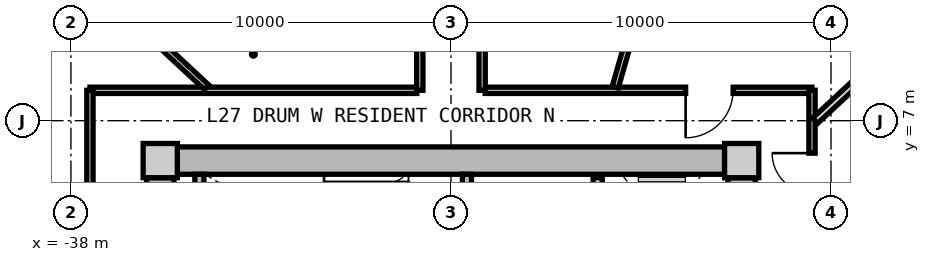
"""IFC4 building model, lengths in metres.
Left out: names, types, materials, properties, quantities, classifications, styles, units other than length and angle.
Written with IfcOpenShell. Run it as: python <this file> out.ifc"""

import sys

from ifc_helpers import new_model, si_unit, direction, frame, frame_2d, origin, origin_2d, place, context, subcontext, project, spatial, rectangle, extrude, source, transform, mapped, element, fill, save


model = new_model("IFC4")
c1 = context("Model", 3, precision=1e-05, world=origin(), true_north=direction((0.0, 1.0)))
c2 = subcontext(c1, "Body", "Model", "MODEL_VIEW")
j1 = project(units=[si_unit("LENGTHUNIT", "METRE"), si_unit("PLANEANGLEUNIT", "RADIAN")], contexts=[c1])
p1 = place(None, origin())
s1 = spatial("IfcSite", under=j1, at=p1, CompositionType="ELEMENT")
p2 = place(p1, origin())
s2 = spatial("IfcBuilding", under=s1, at=p2, CompositionType="ELEMENT")
p3 = place(p2, frame((0.0, 0.0, 90.15)))
s3 = spatial("IfcBuildingStorey", under=s2, at=p3, CompositionType="ELEMENT", Elevation=90.15)
m1 = source(origin(), c2, "Body", "SweptSolid", [
    extrude(rectangle(XDim=0.9, YDim=0.9, at=origin_2d()), origin(), (0.0, 0.0, 1.0), 3.05),
])
for number, where, z_axis, x_axis in (
    (1, (-20.35, 5.95, 0.0), (0.0, 0.0, 1.0), (1.0, 0.0, 0.0)),
    (2, (-35.65, 5.95, 0.0), (0.0, 0.0, 1.0), (1.0, 0.0, 0.0)),
):
    element("IfcColumn", number, at=place(p3, frame(where, z_axis=z_axis, x_axis=x_axis)), inside=s3, PredefinedType="COLUMN", context=c2, shape_type="MappedRepresentation", body=[
        mapped(m1, transform((0.0, 0.0, 0.0), x_axis=(1.0, 0.0, 0.0), y_axis=(0.0, 1.0, 0.0), z_axis=(0.0, 0.0, 1.0), scale=1.0)),
    ])
m2 = source(origin(), c2, "Body", "SweptSolid", [
    extrude(rectangle(XDim=14.4, YDim=0.72, at=frame_2d((7.2, 0.0))), origin(), (0.0, 0.0, 1.0), 2.79),
])
p4 = place(p3, frame((-35.2, 5.95, 0.0), z_axis=(0.0, 0.0, 1.0), x_axis=(1.0, 0.0, 0.0)))
e3 = element("IfcWall", 3, at=p4, inside=s3, PredefinedType="SHEAR", context=c2, shape_type="MappedRepresentation", body=[
    mapped(m2, transform((0.0, 0.0, 0.0), x_axis=(1.0, 0.0, 0.0), y_axis=(0.0, 1.0, 0.0), z_axis=(0.0, 0.0, 1.0), scale=1.0)),
])
m3 = source(origin(), c2, "Body", "SweptSolid", [
    extrude(rectangle(XDim=11.0, YDim=0.72, at=frame_2d((5.5, 0.0))), origin(), (0.0, 0.0, 1.0), 2.79),
])
p5 = place(p3, frame((-35.65, -5.5, 0.0), z_axis=(0.0, 0.0, 1.0), x_axis=(0.0, 1.0, 0.0)))
e4 = element("IfcWall", 4, at=p5, inside=s3, PredefinedType="SHEAR", context=c2, shape_type="MappedRepresentation", body=[
    mapped(m3, transform((0.0, 0.0, 0.0), x_axis=(1.0, 0.0, 0.0), y_axis=(0.0, 1.0, 0.0), z_axis=(0.0, 0.0, 1.0), scale=1.0)),
])
p6 = place(p5, frame((3.8, 0.0, 0.0)))
e5 = element("IfcOpeningElement", 5, at=p6, cuts=e4, PredefinedType="OPENING", context=c2, shape_type="SweptSolid", body=[
    extrude(rectangle(XDim=1.2, YDim=2.15, at=frame_2d((0.6, 1.075))), frame((0.0, 0.37, 0.0), z_axis=(0.0, -1.0, 0.0), x_axis=(1.0, 0.0, 0.0)), (0.0, 0.0, 1.0), 0.74),
])
p7 = place(p3, frame((-20.35, 5.5, 0.0), z_axis=(0.0, 0.0, 1.0), x_axis=(0.0, -1.0, 0.0)))
e6 = element("IfcWall", 6, at=p7, inside=s3, PredefinedType="SHEAR", context=c2, shape_type="MappedRepresentation", body=[
    mapped(m3, transform((0.0, 0.0, 0.0), x_axis=(1.0, 0.0, 0.0), y_axis=(0.0, 1.0, 0.0), z_axis=(0.0, 0.0, 1.0), scale=1.0)),
])
p8 = place(p7, frame((5.65, 0.0, 0.0)))
e7 = element("IfcOpeningElement", 7, at=p8, cuts=e6, PredefinedType="OPENING", context=c2, shape_type="SweptSolid", body=[
    extrude(rectangle(XDim=1.2, YDim=2.15, at=frame_2d((0.6, 1.075))), frame((0.0, 0.37, 0.0), z_axis=(0.0, -1.0, 0.0), x_axis=(1.0, 0.0, 0.0)), (0.0, 0.0, 1.0), 0.74),
])
m4 = source(origin(), c2, "Body", "SweptSolid", [
    extrude(rectangle(XDim=3.14, YDim=0.24, at=frame_2d((1.57, 0.0))), origin(), (0.0, 0.0, 1.0), 2.79),
])
p9 = place(p3, frame((-34.62, 2.45, 0.0), z_axis=(0.0, 0.0, 1.0), x_axis=(0.0, 1.0, 0.0)))
e8 = element("IfcWall", 8, at=p9, inside=s3, PredefinedType="PARTITIONING", context=c2, shape_type="MappedRepresentation", body=[
    mapped(m4, transform((0.0, 0.0, 0.0), x_axis=(1.0, 0.0, 0.0), y_axis=(0.0, 1.0, 0.0), z_axis=(0.0, 0.0, 1.0), scale=1.0)),
])
p10 = place(p3, frame((-27.58, 2.45, 0.0), z_axis=(0.0, 0.0, 1.0), x_axis=(0.0, 1.0, 0.0)))
e9 = element("IfcWall", 9, at=p10, inside=s3, PredefinedType="PARTITIONING", context=c2, shape_type="MappedRepresentation", body=[
    mapped(m4, transform((0.0, 0.0, 0.0), x_axis=(1.0, 0.0, 0.0), y_axis=(0.0, 1.0, 0.0), z_axis=(0.0, 0.0, 1.0), scale=1.0)),
])
p11 = place(p10, frame((0.55, 0.0, 0.0)))
e10 = element("IfcOpeningElement", 10, at=p11, cuts=e9, PredefinedType="OPENING", context=c2, shape_type="SweptSolid", body=[
    extrude(rectangle(XDim=1.1, YDim=2.15, at=frame_2d((0.55, 1.075))), frame((0.0, 0.13, 0.0), z_axis=(0.0, -1.0, 0.0), x_axis=(1.0, 0.0, 0.0)), (0.0, 0.0, 1.0), 0.26),
])
m5 = source(origin(), c2, "Body", "SweptSolid", [
    extrude(rectangle(XDim=5.0, YDim=0.24, at=frame_2d((2.5, 0.0))), origin(), (0.0, 0.0, 1.0), 2.775),
])
p12 = place(p3, frame((-24.14, 0.5, 0.0), z_axis=(0.0, 0.0, 1.0), x_axis=(0.0, 1.0, 0.0)))
e11 = element("IfcWall", 11, at=p12, inside=s3, PredefinedType="PARTITIONING", context=c2, shape_type="MappedRepresentation", body=[
    mapped(m5, transform((0.0, 0.0, 0.0), x_axis=(1.0, 0.0, 0.0), y_axis=(0.0, 1.0, 0.0), z_axis=(0.0, 0.0, 1.0), scale=1.0)),
])
p13 = place(p12, frame((3.05, 0.0, 0.0)))
e12 = element("IfcOpeningElement", 12, at=p13, cuts=e11, PredefinedType="OPENING", context=c2, shape_type="SweptSolid", body=[
    extrude(rectangle(XDim=1.3, YDim=2.2, at=frame_2d((0.65, 1.1))), frame((0.0, 0.13, 0.0), z_axis=(0.0, -1.0, 0.0), x_axis=(1.0, 0.0, 0.0)), (0.0, 0.0, 1.0), 0.26),
])
p14 = place(p12, frame((0.55, 0.0, 0.0)))
e13 = element("IfcOpeningElement", 13, at=p14, cuts=e11, PredefinedType="OPENING", context=c2, shape_type="SweptSolid", body=[
    extrude(rectangle(XDim=1.3, YDim=2.2, at=frame_2d((0.65, 1.1))), frame((0.0, 0.13, 0.0), z_axis=(0.0, -1.0, 0.0), x_axis=(1.0, 0.0, 0.0)), (0.0, 0.0, 1.0), 0.26),
])
m6 = source(origin(), c2, "Body", "SweptSolid", [
    extrude(rectangle(XDim=8.6, YDim=0.165, at=frame_2d((4.3, 0.0))), origin(), (0.0, 0.0, 1.0), 2.775),
])
p15 = place(p3, frame((-37.5, 7.8, 0.0), z_axis=(0.0, 0.0, 1.0), x_axis=(1.0, 0.0, 0.0)))
e14 = element("IfcWall", 14, at=p15, inside=s3, PredefinedType="PARTITIONING", context=c2, shape_type="MappedRepresentation", body=[
    mapped(m6, transform((0.0, 0.0, 0.0), x_axis=(1.0, 0.0, 0.0), y_axis=(0.0, 1.0, 0.0), z_axis=(0.0, 0.0, 1.0), scale=1.0)),
])
p16 = place(p3, frame((-27.1, 7.8, 0.0), z_axis=(0.0, 0.0, 1.0), x_axis=(1.0, 0.0, 0.0)))
e15 = element("IfcWall", 15, at=p16, inside=s3, PredefinedType="PARTITIONING", context=c2, shape_type="MappedRepresentation", body=[
    mapped(m6, transform((0.0, 0.0, 0.0), x_axis=(1.0, 0.0, 0.0), y_axis=(0.0, 1.0, 0.0), z_axis=(0.0, 0.0, 1.0), scale=1.0)),
])
p17 = place(p16, frame((5.275, 0.0, 0.0)))
e16 = element("IfcOpeningElement", 16, at=p17, cuts=e15, PredefinedType="OPENING", context=c2, shape_type="SweptSolid", body=[
    extrude(rectangle(XDim=1.25, YDim=2.2, at=frame_2d((0.625, 1.1))), frame((0.0, 0.093, 0.0), z_axis=(0.0, -1.0, 0.0), x_axis=(1.0, 0.0, 0.0)), (0.0, 0.0, 1.0), 0.185),
])
m7 = source(origin(), c2, "Body", "SweptSolid", [
    extrude(rectangle(XDim=15.6, YDim=0.165, at=frame_2d((7.8, 0.0))), origin(), (0.0, 0.0, 1.0), 2.775),
])
p18 = place(p3, frame((-37.5, -7.8, 0.0), z_axis=(0.0, 0.0, 1.0), x_axis=(0.0, 1.0, 0.0)))
e17 = element("IfcWall", 17, at=p18, inside=s3, PredefinedType="PARTITIONING", context=c2, shape_type="MappedRepresentation", body=[
    mapped(m7, transform((0.0, 0.0, 0.0), x_axis=(1.0, 0.0, 0.0), y_axis=(0.0, 1.0, 0.0), z_axis=(0.0, 0.0, 1.0), scale=1.0)),
])
p19 = place(p18, frame((7.175, 0.0, 0.0)))
e18 = element("IfcOpeningElement", 18, at=p19, cuts=e17, PredefinedType="OPENING", context=c2, shape_type="SweptSolid", body=[
    extrude(rectangle(XDim=1.25, YDim=2.2, at=frame_2d((0.625, 1.1))), frame((0.0, 0.093, 0.0), z_axis=(0.0, -1.0, 0.0), x_axis=(1.0, 0.0, 0.0)), (0.0, 0.0, 1.0), 0.185),
])
p20 = place(p3, frame((-18.5, 7.8, 0.0), z_axis=(0.0, 0.0, 1.0), x_axis=(0.0, -1.0, 0.0)))
e19 = element("IfcWall", 19, at=p20, inside=s3, PredefinedType="PARTITIONING", context=c2, shape_type="MappedRepresentation", body=[
    mapped(m7, transform((0.0, 0.0, 0.0), x_axis=(1.0, 0.0, 0.0), y_axis=(0.0, 1.0, 0.0), z_axis=(0.0, 0.0, 1.0), scale=1.0)),
])
p21 = place(p20, frame((12.002, 0.0, 0.0)))
e20 = element("IfcOpeningElement", 20, at=p21, cuts=e19, PredefinedType="OPENING", context=c2, shape_type="SweptSolid", body=[
    extrude(rectangle(XDim=1.05, YDim=2.15, at=frame_2d((0.525, 1.075))), frame((0.0, 0.093, 0.0), z_axis=(0.0, -1.0, 0.0), x_axis=(1.0, 0.0, 0.0)), (0.0, 0.0, 1.0), 0.185),
])
p22 = place(p20, frame((10.211, 0.0, 0.0)))
e21 = element("IfcOpeningElement", 21, at=p22, cuts=e19, PredefinedType="OPENING", context=c2, shape_type="SweptSolid", body=[
    extrude(rectangle(XDim=1.05, YDim=2.15, at=frame_2d((0.525, 1.075))), frame((0.0, 0.093, 0.0), z_axis=(0.0, -1.0, 0.0), x_axis=(1.0, 0.0, 0.0)), (0.0, 0.0, 1.0), 0.185),
])
p23 = place(p20, frame((7.722, 0.0, 0.0)))
e22 = element("IfcOpeningElement", 22, at=p23, cuts=e19, PredefinedType="OPENING", context=c2, shape_type="SweptSolid", body=[
    extrude(rectangle(XDim=1.05, YDim=2.15, at=frame_2d((0.525, 1.075))), frame((0.0, 0.093, 0.0), z_axis=(0.0, -1.0, 0.0), x_axis=(1.0, 0.0, 0.0)), (0.0, 0.0, 1.0), 0.185),
])
p24 = place(p20, frame((6.291, 0.0, 0.0)))
e23 = element("IfcOpeningElement", 23, at=p24, cuts=e19, PredefinedType="OPENING", context=c2, shape_type="SweptSolid", body=[
    extrude(rectangle(XDim=1.05, YDim=2.15, at=frame_2d((0.525, 1.075))), frame((0.0, 0.093, 0.0), z_axis=(0.0, -1.0, 0.0), x_axis=(1.0, 0.0, 0.0)), (0.0, 0.0, 1.0), 0.185),
])
p25 = place(p20, frame((4.296, 0.0, 0.0)))
e24 = element("IfcOpeningElement", 24, at=p25, cuts=e19, PredefinedType="OPENING", context=c2, shape_type="SweptSolid", body=[
    extrude(rectangle(XDim=1.05, YDim=2.15, at=frame_2d((0.525, 1.075))), frame((0.0, 0.093, 0.0), z_axis=(0.0, -1.0, 0.0), x_axis=(1.0, 0.0, 0.0)), (0.0, 0.0, 1.0), 0.185),
])
p26 = place(p20, frame((1.654, 0.0, 0.0)))
e25 = element("IfcOpeningElement", 25, at=p26, cuts=e19, PredefinedType="OPENING", context=c2, shape_type="SweptSolid", body=[
    extrude(rectangle(XDim=1.05, YDim=2.15, at=frame_2d((0.525, 1.075))), frame((0.0, 0.093, 0.0), z_axis=(0.0, -1.0, 0.0), x_axis=(1.0, 0.0, 0.0)), (0.0, 0.0, 1.0), 0.185),
])
m8 = source(origin(), c2, "Body", "SweptSolid", [
    extrude(rectangle(XDim=8.989, YDim=0.165, at=frame_2d((4.495, 0.0))), origin(), (0.0, 0.0, 1.0), 2.275),
])
p27 = place(p3, frame((-23.678, 7.88, 0.0), z_axis=(0.0, 0.0, 1.0), x_axis=(0.27702323008, 0.960863221274, 0.0)))
e26 = element("IfcWall", 26, at=p27, inside=s3, PredefinedType="PARTITIONING", context=c2, shape_type="MappedRepresentation", body=[
    mapped(m8, transform((0.0, 0.0, 0.0), x_axis=(1.0, 0.0, 0.0), y_axis=(0.0, 1.0, 0.0), z_axis=(0.0, 0.0, 1.0), scale=1.0)),
])
m9 = source(origin(), c2, "Body", "SweptSolid", [
    extrude(rectangle(XDim=6.187, YDim=0.165, at=frame_2d((3.093, 0.0))), origin(), (0.0, 0.0, 1.0), 2.275),
])
p28 = place(p3, frame((-34.429, 7.88, 0.0), z_axis=(0.0, 0.0, 1.0), x_axis=(-0.732501077882, 0.680765870841, 0.0)))
e27 = element("IfcWall", 27, at=p28, inside=s3, PredefinedType="PARTITIONING", context=c2, shape_type="MappedRepresentation", body=[
    mapped(m9, transform((0.0, 0.0, 0.0), x_axis=(1.0, 0.0, 0.0), y_axis=(0.0, 1.0, 0.0), z_axis=(0.0, 0.0, 1.0), scale=1.0)),
])
m10 = source(origin(), c2, "Body", "SweptSolid", [
    extrude(rectangle(XDim=7.56, YDim=0.165, at=frame_2d((3.78, 0.0))), origin(), (0.0, 0.0, 1.0), 2.775),
])
p29 = place(p3, frame((-28.82, 7.8, 0.0), z_axis=(0.0, 0.0, 1.0), x_axis=(0.0, 1.0, 0.0)))
e28 = element("IfcWall", 28, at=p29, inside=s3, PredefinedType="PARTITIONING", context=c2, shape_type="MappedRepresentation", body=[
    mapped(m10, transform((0.0, 0.0, 0.0), x_axis=(1.0, 0.0, 0.0), y_axis=(0.0, 1.0, 0.0), z_axis=(0.0, 0.0, 1.0), scale=1.0)),
])
p30 = place(p29, frame((3.255, 0.0, 0.0)))
e29 = element("IfcOpeningElement", 29, at=p30, cuts=e28, PredefinedType="OPENING", context=c2, shape_type="SweptSolid", body=[
    extrude(rectangle(XDim=1.05, YDim=2.15, at=frame_2d((0.525, 1.075))), frame((0.0, 0.093, 0.0), z_axis=(0.0, -1.0, 0.0), x_axis=(1.0, 0.0, 0.0)), (0.0, 0.0, 1.0), 0.185),
])
p31 = place(p3, frame((-27.18, 7.8, 0.0), z_axis=(0.0, 0.0, 1.0), x_axis=(0.0, 1.0, 0.0)))
e30 = element("IfcWall", 30, at=p31, inside=s3, PredefinedType="PARTITIONING", context=c2, shape_type="MappedRepresentation", body=[
    mapped(m10, transform((0.0, 0.0, 0.0), x_axis=(1.0, 0.0, 0.0), y_axis=(0.0, 1.0, 0.0), z_axis=(0.0, 0.0, 1.0), scale=1.0)),
])
p32 = place(p31, frame((3.255, 0.0, 0.0)))
e31 = element("IfcOpeningElement", 31, at=p32, cuts=e30, PredefinedType="OPENING", context=c2, shape_type="SweptSolid", body=[
    extrude(rectangle(XDim=1.05, YDim=2.15, at=frame_2d((0.525, 1.075))), frame((0.0, 0.093, 0.0), z_axis=(0.0, -1.0, 0.0), x_axis=(1.0, 0.0, 0.0)), (0.0, 0.0, 1.0), 0.185),
])
m11 = source(origin(), c2, "Body", "SweptSolid", [
    extrude(rectangle(XDim=7.482, YDim=0.19, at=frame_2d((3.741, 0.0))), origin(), (0.0, 0.0, 1.0), 2.275),
])
p33 = place(p3, frame((-18.42, 6.998, 0.0), z_axis=(0.0, 0.0, 1.0), x_axis=(0.732508698043, 0.680757671489, 0.0)))
e32 = element("IfcWall", 32, at=p33, inside=s3, PredefinedType="PARTITIONING", context=c2, shape_type="MappedRepresentation", body=[
    mapped(m11, transform((0.0, 0.0, 0.0), x_axis=(1.0, 0.0, 0.0), y_axis=(0.0, 1.0, 0.0), z_axis=(0.0, 0.0, 1.0), scale=1.0)),
])
m12 = source(origin(), c2, "Body", "SweptSolid", [
    extrude(rectangle(XDim=8.968, YDim=0.19, at=frame_2d((4.484, 0.0))), origin(), (0.0, 0.0, 1.0), 2.775),
])
p34 = place(p3, frame((-18.47, 4.036, 0.0), z_axis=(0.0, 0.0, 1.0), x_axis=(0.882202936563, 0.47086938605, 0.0)))
e33 = element("IfcWall", 33, at=p34, inside=s3, PredefinedType="PARTITIONING", context=c2, shape_type="MappedRepresentation", body=[
    mapped(m12, transform((0.0, 0.0, 0.0), x_axis=(1.0, 0.0, 0.0), y_axis=(0.0, 1.0, 0.0), z_axis=(0.0, 0.0, 1.0), scale=1.0)),
])
m13 = source(origin(), c2, "Body", "SweptSolid", [
    extrude(rectangle(XDim=1.05, YDim=2.15, at=frame_2d((0.525, 1.075))), frame((0.0, 0.025, 0.0), z_axis=(0.0, -1.0, 0.0), x_axis=(1.0, 0.0, 0.0)), (0.0, 0.0, 1.0), 0.05),
])
p35 = place(p26, frame((1.05, 0.0, 0.0), z_axis=(0.0, 0.0, 1.0), x_axis=(-1.0, 0.0, 0.0)))
e34 = element("IfcDoor", 34, at=p35, inside=s3, OperationType="SINGLE_SWING_RIGHT", PredefinedType="DOOR", context=c2, shape_type="MappedRepresentation", body=[
    mapped(m13, transform((0.0, 0.0, 0.0), x_axis=(1.0, 0.0, 0.0), y_axis=(0.0, 1.0, 0.0), z_axis=(0.0, 0.0, 1.0), scale=1.0)),
])
fill(e25, e34)
m14 = source(origin(), c2, "Body", "SweptSolid", [
    extrude(rectangle(XDim=1.25, YDim=2.2, at=frame_2d((0.625, 1.1))), frame((0.0, 0.025, 0.0), z_axis=(0.0, -1.0, 0.0), x_axis=(1.0, 0.0, 0.0)), (0.0, 0.0, 1.0), 0.05),
])
p36 = place(p17, frame((1.25, 0.0, 0.0), z_axis=(0.0, 0.0, 1.0), x_axis=(-1.0, 0.0, 0.0)))
e35 = element("IfcDoor", 35, at=p36, inside=s3, OperationType="SINGLE_SWING_RIGHT", PredefinedType="DOOR", context=c2, shape_type="MappedRepresentation", body=[
    mapped(m14, transform((0.0, 0.0, 0.0), x_axis=(1.0, 0.0, 0.0), y_axis=(0.0, 1.0, 0.0), z_axis=(0.0, 0.0, 1.0), scale=1.0)),
])
fill(e16, e35)
save(model, sys.argv[1])
